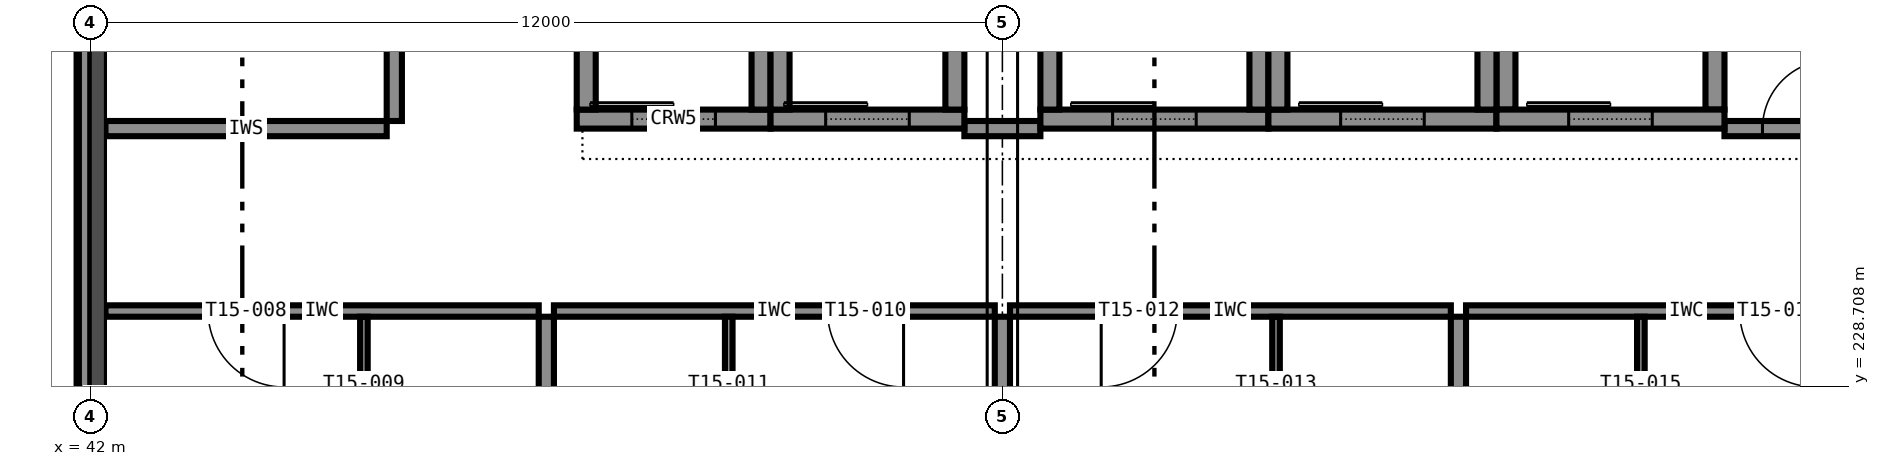
"""IFC4 building model, lengths in metres.
Left out: names, types, materials, properties, quantities, classifications, styles, units other than length and angle.
Written with IfcOpenShell. Run it as: python <this file> out.ifc"""

import sys

from ifc_helpers import new_model, si_unit, direction, frame, frame_2d, origin, place, context, subcontext, project, spatial, rectangle, extrude, element, fill, save


model = new_model("IFC4")
c1 = context("Model", 3, precision=1e-05, world=origin(), true_north=direction((0.0, 1.0)))
c2 = subcontext(c1, "Body", "Model", "MODEL_VIEW")
j1 = project(units=[si_unit("LENGTHUNIT", "METRE"), si_unit("PLANEANGLEUNIT", "RADIAN")], contexts=[c1])
p1 = place(None, origin())
s1 = spatial("IfcSite", under=j1, at=p1, CompositionType="ELEMENT")
p2 = place(p1, origin())
s2 = spatial("IfcBuilding", under=s1, at=p2, CompositionType="ELEMENT")
p3 = place(p2, frame((0.0, 0.0, 60.6)))
s3 = spatial("IfcBuildingStorey", under=s2, at=p3, CompositionType="ELEMENT", Elevation=60.6)
p4 = place(p3, frame((54.5, 232.225, 0.0), z_axis=(0.0, 0.0, 1.0), x_axis=(1.0, 0.0, 0.0)))
e1 = element("IfcWall", 1, at=p4, inside=s3, PredefinedType="SHEAR", context=c2, shape_type="SweptSolid", body=[
    extrude(rectangle(XDim=3.0, YDim=0.25, at=frame_2d((1.5, 0.0))), origin(), (0.0, 0.0, 1.0), 3.6),
])
p5 = place(p4, frame((0.95, 0.0, 0.0)))
e2 = element("IfcOpeningElement", 2, at=p5, cuts=e1, PredefinedType="OPENING", context=c2, shape_type="SweptSolid", body=[
    extrude(rectangle(XDim=1.1, YDim=2.1, at=frame_2d((0.55, 1.05))), frame((0.0, 0.135, 0.0), z_axis=(0.0, -1.0, 0.0), x_axis=(1.0, 0.0, 0.0)), (0.0, 0.0, 1.0), 0.27),
])
for number, where, z_axis, x_axis in (
    (3, (54.625, 232.35, 0.0), (0.0, 0.0, 1.0), (0.0, 1.0, 0.0)),
    (4, (57.375, 232.35, 0.0), (0.0, 0.0, 1.0), (0.0, 1.0, 0.0)),
):
    element("IfcWall", number, at=place(p3, frame(where, z_axis=z_axis, x_axis=x_axis)), inside=s3, PredefinedType="SHEAR", context=c2, shape_type="SweptSolid", body=[
        extrude(rectangle(XDim=3.3, YDim=0.25, at=frame_2d((1.65, 0.0))), origin(), (0.0, 0.0, 1.0), 3.6),
    ])
p6 = place(p3, frame((57.5, 232.225, 0.0), z_axis=(0.0, 0.0, 1.0), x_axis=(1.0, 0.0, 0.0)))
e5 = element("IfcWall", 5, at=p6, inside=s3, PredefinedType="SHEAR", context=c2, shape_type="SweptSolid", body=[
    extrude(rectangle(XDim=3.0, YDim=0.25, at=frame_2d((1.5, 0.0))), origin(), (0.0, 0.0, 1.0), 3.6),
])
p7 = place(p6, frame((0.95, 0.0, 0.0)))
e6 = element("IfcOpeningElement", 6, at=p7, cuts=e5, PredefinedType="OPENING", context=c2, shape_type="SweptSolid", body=[
    extrude(rectangle(XDim=1.1, YDim=2.1, at=frame_2d((0.55, 1.05))), frame((0.0, 0.135, 0.0), z_axis=(0.0, -1.0, 0.0), x_axis=(1.0, 0.0, 0.0)), (0.0, 0.0, 1.0), 0.27),
])
for number, where, z_axis, x_axis in (
    (7, (57.625, 232.35, 0.0), (0.0, 0.0, 1.0), (0.0, 1.0, 0.0)),
    (8, (60.375, 232.35, 0.0), (0.0, 0.0, 1.0), (0.0, 1.0, 0.0)),
):
    element("IfcWall", number, at=place(p3, frame(where, z_axis=z_axis, x_axis=x_axis)), inside=s3, PredefinedType="SHEAR", context=c2, shape_type="SweptSolid", body=[
        extrude(rectangle(XDim=3.3, YDim=0.25, at=frame_2d((1.65, 0.0))), origin(), (0.0, 0.0, 1.0), 3.6),
    ])
p8 = place(p3, frame((60.5, 232.225, 0.0), z_axis=(0.0, 0.0, 1.0), x_axis=(1.0, 0.0, 0.0)))
e9 = element("IfcWall", 9, at=p8, inside=s3, PredefinedType="SHEAR", context=c2, shape_type="SweptSolid", body=[
    extrude(rectangle(XDim=3.0, YDim=0.25, at=frame_2d((1.5, 0.0))), origin(), (0.0, 0.0, 1.0), 3.6),
])
p9 = place(p8, frame((0.95, 0.0, 0.0)))
e10 = element("IfcOpeningElement", 10, at=p9, cuts=e9, PredefinedType="OPENING", context=c2, shape_type="SweptSolid", body=[
    extrude(rectangle(XDim=1.1, YDim=2.1, at=frame_2d((0.55, 1.05))), frame((0.0, 0.135, 0.0), z_axis=(0.0, -1.0, 0.0), x_axis=(1.0, 0.0, 0.0)), (0.0, 0.0, 1.0), 0.27),
])
for number, where, z_axis, x_axis in (
    (11, (60.625, 232.35, 0.0), (0.0, 0.0, 1.0), (0.0, 1.0, 0.0)),
    (12, (63.375, 232.35, 0.0), (0.0, 0.0, 1.0), (0.0, 1.0, 0.0)),
):
    element("IfcWall", number, at=place(p3, frame(where, z_axis=z_axis, x_axis=x_axis)), inside=s3, PredefinedType="SHEAR", context=c2, shape_type="SweptSolid", body=[
        extrude(rectangle(XDim=3.3, YDim=0.25, at=frame_2d((1.65, 0.0))), origin(), (0.0, 0.0, 1.0), 3.6),
    ])
p10 = place(p3, frame((48.4, 232.225, 0.0), z_axis=(0.0, 0.0, 1.0), x_axis=(1.0, 0.0, 0.0)))
e13 = element("IfcWall", 13, at=p10, inside=s3, PredefinedType="SHEAR", context=c2, shape_type="SweptSolid", body=[
    extrude(rectangle(XDim=2.55, YDim=0.25, at=frame_2d((1.275, 0.0))), origin(), (0.0, 0.0, 1.0), 3.6),
])
p11 = place(p10, frame((0.725, 0.0, 0.0)))
e14 = element("IfcOpeningElement", 14, at=p11, cuts=e13, PredefinedType="OPENING", context=c2, shape_type="SweptSolid", body=[
    extrude(rectangle(XDim=1.1, YDim=2.1, at=frame_2d((0.55, 1.05))), frame((0.0, 0.135, 0.0), z_axis=(0.0, -1.0, 0.0), x_axis=(1.0, 0.0, 0.0)), (0.0, 0.0, 1.0), 0.27),
])
for number, where, z_axis, x_axis in (
    (15, (48.525, 232.35, 0.0), (0.0, 0.0, 1.0), (0.0, 1.0, 0.0)),
    (16, (50.825, 232.35, 0.0), (0.0, 0.0, 1.0), (0.0, 1.0, 0.0)),
):
    element("IfcWall", number, at=place(p3, frame(where, z_axis=z_axis, x_axis=x_axis)), inside=s3, PredefinedType="SHEAR", context=c2, shape_type="SweptSolid", body=[
        extrude(rectangle(XDim=3.3, YDim=0.25, at=frame_2d((1.65, 0.0))), origin(), (0.0, 0.0, 1.0), 3.6),
    ])
p12 = place(p3, frame((50.95, 232.225, 0.0), z_axis=(0.0, 0.0, 1.0), x_axis=(1.0, 0.0, 0.0)))
e17 = element("IfcWall", 17, at=p12, inside=s3, PredefinedType="SHEAR", context=c2, shape_type="SweptSolid", body=[
    extrude(rectangle(XDim=2.55, YDim=0.25, at=frame_2d((1.275, 0.0))), origin(), (0.0, 0.0, 1.0), 3.6),
])
p13 = place(p12, frame((0.725, 0.0, 0.0)))
e18 = element("IfcOpeningElement", 18, at=p13, cuts=e17, PredefinedType="OPENING", context=c2, shape_type="SweptSolid", body=[
    extrude(rectangle(XDim=1.1, YDim=2.1, at=frame_2d((0.55, 1.05))), frame((0.0, 0.135, 0.0), z_axis=(0.0, -1.0, 0.0), x_axis=(1.0, 0.0, 0.0)), (0.0, 0.0, 1.0), 0.27),
])
for number, where, z_axis, x_axis in (
    (19, (51.075, 232.35, 0.0), (0.0, 0.0, 1.0), (0.0, 1.0, 0.0)),
    (20, (53.375, 232.35, 0.0), (0.0, 0.0, 1.0), (0.0, 1.0, 0.0)),
):
    element("IfcWall", number, at=place(p3, frame(where, z_axis=z_axis, x_axis=x_axis)), inside=s3, PredefinedType="SHEAR", context=c2, shape_type="SweptSolid", body=[
        extrude(rectangle(XDim=3.3, YDim=0.25, at=frame_2d((1.65, 0.0))), origin(), (0.0, 0.0, 1.0), 3.6),
    ])
p14 = place(p3, frame((41.925, 233.65, 3.4), z_axis=(0.0, 0.0, 1.0), x_axis=(0.0, -1.0, 0.0)))
e21 = element("IfcWall", 21, at=p14, inside=s3, PredefinedType="STANDARD", context=c2, shape_type="SweptSolid", body=[
    extrude(rectangle(XDim=11.3, YDim=0.15, at=frame_2d((5.65, 0.0))), origin(), (0.0, 0.0, 1.0), 0.2),
])
p15 = place(p3, frame((42.2, 232.1, 0.0), z_axis=(0.0, 0.0, 1.0), x_axis=(1.0, 0.0, 0.0)))
e22 = element("IfcWall", 22, at=p15, inside=s3, PredefinedType="PARTITIONING", context=c2, shape_type="SweptSolid", body=[
    extrude(rectangle(XDim=3.7, YDim=0.2, at=frame_2d((1.85, 0.0))), origin(), (0.0, 0.0, 1.0), 3.4),
])
p16 = place(p3, frame((53.5, 232.1, 0.0), z_axis=(0.0, 0.0, 1.0), x_axis=(1.0, 0.0, 0.0)))
e23 = element("IfcWall", 23, at=p16, inside=s3, PredefinedType="PARTITIONING", context=c2, shape_type="SweptSolid", body=[
    extrude(rectangle(XDim=1.0, YDim=0.2, at=frame_2d((0.5, 0.0))), origin(), (0.0, 0.0, 1.0), 3.4),
])
p17 = place(p3, frame((63.5, 232.1, 0.0), z_axis=(0.0, 0.0, 1.0), x_axis=(1.0, 0.0, 0.0)))
e24 = element("IfcWall", 24, at=p17, inside=s3, PredefinedType="PARTITIONING", context=c2, shape_type="SweptSolid", body=[
    extrude(rectangle(XDim=1.9, YDim=0.2, at=frame_2d((0.95, 0.0))), origin(), (0.0, 0.0, 1.0), 3.4),
])
p18 = place(p17, frame((0.5, 0.0, 0.0)))
e25 = element("IfcOpeningElement", 25, at=p18, cuts=e24, PredefinedType="OPENING", context=c2, shape_type="SweptSolid", body=[
    extrude(rectangle(XDim=0.9, YDim=2.1, at=frame_2d((0.45, 1.05))), frame((0.0, 0.11, 0.0), z_axis=(0.0, -1.0, 0.0), x_axis=(1.0, 0.0, 0.0)), (0.0, 0.0, 1.0), 0.22),
])
p19 = place(p3, frame((46.0, 232.2, 0.0), z_axis=(0.0, 0.0, 1.0), x_axis=(0.0, 1.0, 0.0)))
e26 = element("IfcWall", 26, at=p19, inside=s3, PredefinedType="PARTITIONING", context=c2, shape_type="SweptSolid", body=[
    extrude(rectangle(XDim=3.6, YDim=0.2, at=frame_2d((1.8, 0.0))), origin(), (0.0, 0.0, 1.0), 3.4),
])
p20 = place(p19, frame((1.35, 0.0, 0.0)))
e27 = element("IfcOpeningElement", 27, at=p20, cuts=e26, PredefinedType="OPENING", context=c2, shape_type="SweptSolid", body=[
    extrude(rectangle(XDim=0.9, YDim=2.1, at=frame_2d((0.45, 1.05))), frame((0.0, 0.11, 0.0), z_axis=(0.0, -1.0, 0.0), x_axis=(1.0, 0.0, 0.0)), (0.0, 0.0, 1.0), 0.22),
])
p21 = place(p3, frame((47.9, 229.7, 0.0), z_axis=(0.0, 0.0, 1.0), x_axis=(-1.0, 0.0, 0.0)))
e28 = element("IfcWall", 28, at=p21, inside=s3, PredefinedType="PARTITIONING", context=c2, shape_type="SweptSolid", body=[
    extrude(rectangle(XDim=5.7, YDim=0.15, at=frame_2d((2.85, 0.0))), origin(), (0.0, 0.0, 1.0), 3.4),
])
p22 = place(p21, frame((3.35, 0.0, 0.0)))
e29 = element("IfcOpeningElement", 29, at=p22, cuts=e28, PredefinedType="OPENING", context=c2, shape_type="SweptSolid", body=[
    extrude(rectangle(XDim=1.0, YDim=2.1, at=frame_2d((0.5, 1.05))), frame((0.0, 0.085, 0.0), z_axis=(0.0, -1.0, 0.0), x_axis=(1.0, 0.0, 0.0)), (0.0, 0.0, 1.0), 0.17),
])
p23 = place(p3, frame((45.6, 226.75, 0.0), z_axis=(0.0, 0.0, 1.0), x_axis=(0.0, 1.0, 0.0)))
e30 = element("IfcWall", 30, at=p23, inside=s3, PredefinedType="PARTITIONING", context=c2, shape_type="SweptSolid", body=[
    extrude(rectangle(XDim=2.875, YDim=0.1, at=frame_2d((1.438, 0.0))), origin(), (0.0, 0.0, 1.0), 3.4),
])
p24 = place(p23, frame((1.038, 0.0, 0.0)))
e31 = element("IfcOpeningElement", 31, at=p24, cuts=e30, PredefinedType="OPENING", context=c2, shape_type="SweptSolid", body=[
    extrude(rectangle(XDim=0.8, YDim=2.1, at=frame_2d((0.4, 1.05))), frame((0.0, 0.06, 0.0), z_axis=(0.0, -1.0, 0.0), x_axis=(1.0, 0.0, 0.0)), (0.0, 0.0, 1.0), 0.12),
])
p25 = place(p3, frame((53.9, 229.7, 0.0), z_axis=(0.0, 0.0, 1.0), x_axis=(-1.0, 0.0, 0.0)))
e32 = element("IfcWall", 32, at=p25, inside=s3, PredefinedType="PARTITIONING", context=c2, shape_type="SweptSolid", body=[
    extrude(rectangle(XDim=5.8, YDim=0.15, at=frame_2d((2.9, 0.0))), origin(), (0.0, 0.0, 1.0), 3.4),
])
p26 = place(p25, frame((1.2, 0.0, 0.0)))
e33 = element("IfcOpeningElement", 33, at=p26, cuts=e32, PredefinedType="OPENING", context=c2, shape_type="SweptSolid", body=[
    extrude(rectangle(XDim=1.0, YDim=2.1, at=frame_2d((0.5, 1.05))), frame((0.0, 0.085, 0.0), z_axis=(0.0, -1.0, 0.0), x_axis=(1.0, 0.0, 0.0)), (0.0, 0.0, 1.0), 0.17),
])
p27 = place(p3, frame((50.4, 229.625, 0.0), z_axis=(0.0, 0.0, 1.0), x_axis=(0.0, -1.0, 0.0)))
e34 = element("IfcWall", 34, at=p27, inside=s3, PredefinedType="PARTITIONING", context=c2, shape_type="SweptSolid", body=[
    extrude(rectangle(XDim=2.875, YDim=0.1, at=frame_2d((1.438, 0.0))), origin(), (0.0, 0.0, 1.0), 3.4),
])
p28 = place(p27, frame((1.038, 0.0, 0.0)))
e35 = element("IfcOpeningElement", 35, at=p28, cuts=e34, PredefinedType="OPENING", context=c2, shape_type="SweptSolid", body=[
    extrude(rectangle(XDim=0.8, YDim=2.1, at=frame_2d((0.4, 1.05))), frame((0.0, 0.06, 0.0), z_axis=(0.0, -1.0, 0.0), x_axis=(1.0, 0.0, 0.0)), (0.0, 0.0, 1.0), 0.12),
])
p29 = place(p3, frame((59.9, 229.7, 0.0), z_axis=(0.0, 0.0, 1.0), x_axis=(-1.0, 0.0, 0.0)))
e36 = element("IfcWall", 36, at=p29, inside=s3, PredefinedType="PARTITIONING", context=c2, shape_type="SweptSolid", body=[
    extrude(rectangle(XDim=5.8, YDim=0.15, at=frame_2d((2.9, 0.0))), origin(), (0.0, 0.0, 1.0), 3.4),
])
p30 = place(p29, frame((3.6, 0.0, 0.0)))
e37 = element("IfcOpeningElement", 37, at=p30, cuts=e36, PredefinedType="OPENING", context=c2, shape_type="SweptSolid", body=[
    extrude(rectangle(XDim=1.0, YDim=2.1, at=frame_2d((0.5, 1.05))), frame((0.0, 0.085, 0.0), z_axis=(0.0, -1.0, 0.0), x_axis=(1.0, 0.0, 0.0)), (0.0, 0.0, 1.0), 0.17),
])
p31 = place(p3, frame((57.6, 226.75, 0.0), z_axis=(0.0, 0.0, 1.0), x_axis=(0.0, 1.0, 0.0)))
e38 = element("IfcWall", 38, at=p31, inside=s3, PredefinedType="PARTITIONING", context=c2, shape_type="SweptSolid", body=[
    extrude(rectangle(XDim=2.875, YDim=0.1, at=frame_2d((1.438, 0.0))), origin(), (0.0, 0.0, 1.0), 3.4),
])
p32 = place(p31, frame((1.038, 0.0, 0.0)))
e39 = element("IfcOpeningElement", 39, at=p32, cuts=e38, PredefinedType="OPENING", context=c2, shape_type="SweptSolid", body=[
    extrude(rectangle(XDim=0.8, YDim=2.1, at=frame_2d((0.4, 1.05))), frame((0.0, 0.06, 0.0), z_axis=(0.0, -1.0, 0.0), x_axis=(1.0, 0.0, 0.0)), (0.0, 0.0, 1.0), 0.12),
])
p33 = place(p3, frame((65.9, 229.7, 0.0), z_axis=(0.0, 0.0, 1.0), x_axis=(-1.0, 0.0, 0.0)))
e40 = element("IfcWall", 40, at=p33, inside=s3, PredefinedType="PARTITIONING", context=c2, shape_type="SweptSolid", body=[
    extrude(rectangle(XDim=5.8, YDim=0.15, at=frame_2d((2.9, 0.0))), origin(), (0.0, 0.0, 1.0), 3.4),
])
p34 = place(p33, frame((1.2, 0.0, 0.0)))
e41 = element("IfcOpeningElement", 41, at=p34, cuts=e40, PredefinedType="OPENING", context=c2, shape_type="SweptSolid", body=[
    extrude(rectangle(XDim=1.0, YDim=2.1, at=frame_2d((0.5, 1.05))), frame((0.0, 0.085, 0.0), z_axis=(0.0, -1.0, 0.0), x_axis=(1.0, 0.0, 0.0)), (0.0, 0.0, 1.0), 0.17),
])
p35 = place(p3, frame((62.4, 229.625, 0.0), z_axis=(0.0, 0.0, 1.0), x_axis=(0.0, -1.0, 0.0)))
e42 = element("IfcWall", 42, at=p35, inside=s3, PredefinedType="PARTITIONING", context=c2, shape_type="SweptSolid", body=[
    extrude(rectangle(XDim=2.875, YDim=0.1, at=frame_2d((1.438, 0.0))), origin(), (0.0, 0.0, 1.0), 3.4),
])
p36 = place(p35, frame((1.038, 0.0, 0.0)))
e43 = element("IfcOpeningElement", 43, at=p36, cuts=e42, PredefinedType="OPENING", context=c2, shape_type="SweptSolid", body=[
    extrude(rectangle(XDim=0.8, YDim=2.1, at=frame_2d((0.4, 1.05))), frame((0.0, 0.06, 0.0), z_axis=(0.0, -1.0, 0.0), x_axis=(1.0, 0.0, 0.0)), (0.0, 0.0, 1.0), 0.12),
])
p37 = place(p3, frame((48.0, 222.3, 0.0), z_axis=(0.0, 0.0, 1.0), x_axis=(0.0, 1.0, 0.0)))
e44 = element("IfcWall", 44, at=p37, inside=s3, PredefinedType="PARTITIONING", context=c2, shape_type="SweptSolid", body=[
    extrude(rectangle(XDim=7.325, YDim=0.2, at=frame_2d((3.663, 0.0))), origin(), (0.0, 0.0, 1.0), 3.4),
])
p38 = place(p3, frame((54.0, 222.35, 0.0), z_axis=(0.0, 0.0, 1.0), x_axis=(0.0, 1.0, 0.0)))
e45 = element("IfcWall", 45, at=p38, inside=s3, PredefinedType="PARTITIONING", context=c2, shape_type="SweptSolid", body=[
    extrude(rectangle(XDim=7.275, YDim=0.2, at=frame_2d((3.637, 0.0))), origin(), (0.0, 0.0, 1.0), 2.6),
])
p39 = place(p3, frame((60.0, 222.3, 0.0), z_axis=(0.0, 0.0, 1.0), x_axis=(0.0, 1.0, 0.0)))
e46 = element("IfcWall", 46, at=p39, inside=s3, PredefinedType="PARTITIONING", context=c2, shape_type="SweptSolid", body=[
    extrude(rectangle(XDim=7.325, YDim=0.2, at=frame_2d((3.663, 0.0))), origin(), (0.0, 0.0, 1.0), 3.4),
])
p40 = place(p18, origin())
e47 = element("IfcDoor", 47, at=p40, inside=s3, OperationType="SINGLE_SWING_RIGHT", PredefinedType="DOOR", context=c2, shape_type="SweptSolid", body=[
    extrude(rectangle(XDim=0.9, YDim=2.1, at=frame_2d((0.45, 1.05))), frame((0.0, 0.025, 0.0), z_axis=(0.0, -1.0, 0.0), x_axis=(1.0, 0.0, 0.0)), (0.0, 0.0, 1.0), 0.05),
])
fill(e25, e47)
p41 = place(p22, origin())
e48 = element("IfcDoor", 48, at=p41, inside=s3, OperationType="SINGLE_SWING_LEFT", PredefinedType="DOOR", context=c2, shape_type="SweptSolid", body=[
    extrude(rectangle(XDim=1.0, YDim=2.1, at=frame_2d((0.5, 1.05))), frame((0.0, 0.025, 0.0), z_axis=(0.0, -1.0, 0.0), x_axis=(1.0, 0.0, 0.0)), (0.0, 0.0, 1.0), 0.05),
])
fill(e29, e48)
p42 = place(p26, origin())
e49 = element("IfcDoor", 49, at=p42, inside=s3, OperationType="SINGLE_SWING_LEFT", PredefinedType="DOOR", context=c2, shape_type="SweptSolid", body=[
    extrude(rectangle(XDim=1.0, YDim=2.1, at=frame_2d((0.5, 1.05))), frame((0.0, 0.025, 0.0), z_axis=(0.0, -1.0, 0.0), x_axis=(1.0, 0.0, 0.0)), (0.0, 0.0, 1.0), 0.05),
])
fill(e33, e49)
p43 = place(p30, origin())
e50 = element("IfcDoor", 50, at=p43, inside=s3, OperationType="SINGLE_SWING_RIGHT", PredefinedType="DOOR", context=c2, shape_type="SweptSolid", body=[
    extrude(rectangle(XDim=1.0, YDim=2.1, at=frame_2d((0.5, 1.05))), frame((0.0, 0.025, 0.0), z_axis=(0.0, -1.0, 0.0), x_axis=(1.0, 0.0, 0.0)), (0.0, 0.0, 1.0), 0.05),
])
fill(e37, e50)
p44 = place(p34, origin())
e51 = element("IfcDoor", 51, at=p44, inside=s3, OperationType="SINGLE_SWING_LEFT", PredefinedType="DOOR", context=c2, shape_type="SweptSolid", body=[
    extrude(rectangle(XDim=1.0, YDim=2.1, at=frame_2d((0.5, 1.05))), frame((0.0, 0.025, 0.0), z_axis=(0.0, -1.0, 0.0), x_axis=(1.0, 0.0, 0.0)), (0.0, 0.0, 1.0), 0.05),
])
fill(e41, e51)
p45 = place(p5, origin())
e52 = element("IfcDoor", 52, at=p45, inside=s3, OperationType="SLIDING_TO_LEFT", PredefinedType="DOOR", context=c2, shape_type="SweptSolid", body=[
    extrude(rectangle(XDim=1.1, YDim=2.1, at=frame_2d((0.55, 1.05))), frame((0.0, 0.025, 0.0), z_axis=(0.0, -1.0, 0.0), x_axis=(1.0, 0.0, 0.0)), (0.0, 0.0, 1.0), 0.05),
])
fill(e2, e52)
p46 = place(p7, origin())
e53 = element("IfcDoor", 53, at=p46, inside=s3, OperationType="SLIDING_TO_LEFT", PredefinedType="DOOR", context=c2, shape_type="SweptSolid", body=[
    extrude(rectangle(XDim=1.1, YDim=2.1, at=frame_2d((0.55, 1.05))), frame((0.0, 0.025, 0.0), z_axis=(0.0, -1.0, 0.0), x_axis=(1.0, 0.0, 0.0)), (0.0, 0.0, 1.0), 0.05),
])
fill(e6, e53)
p47 = place(p9, origin())
e54 = element("IfcDoor", 54, at=p47, inside=s3, OperationType="SLIDING_TO_LEFT", PredefinedType="DOOR", context=c2, shape_type="SweptSolid", body=[
    extrude(rectangle(XDim=1.1, YDim=2.1, at=frame_2d((0.55, 1.05))), frame((0.0, 0.025, 0.0), z_axis=(0.0, -1.0, 0.0), x_axis=(1.0, 0.0, 0.0)), (0.0, 0.0, 1.0), 0.05),
])
fill(e10, e54)
p48 = place(p11, origin())
e55 = element("IfcDoor", 55, at=p48, inside=s3, OperationType="SLIDING_TO_LEFT", PredefinedType="DOOR", context=c2, shape_type="SweptSolid", body=[
    extrude(rectangle(XDim=1.1, YDim=2.1, at=frame_2d((0.55, 1.05))), frame((0.0, 0.025, 0.0), z_axis=(0.0, -1.0, 0.0), x_axis=(1.0, 0.0, 0.0)), (0.0, 0.0, 1.0), 0.05),
])
fill(e14, e55)
p49 = place(p13, origin())
e56 = element("IfcDoor", 56, at=p49, inside=s3, OperationType="SLIDING_TO_LEFT", PredefinedType="DOOR", context=c2, shape_type="SweptSolid", body=[
    extrude(rectangle(XDim=1.1, YDim=2.1, at=frame_2d((0.55, 1.05))), frame((0.0, 0.025, 0.0), z_axis=(0.0, -1.0, 0.0), x_axis=(1.0, 0.0, 0.0)), (0.0, 0.0, 1.0), 0.05),
])
fill(e18, e56)
save(model, sys.argv[1])
